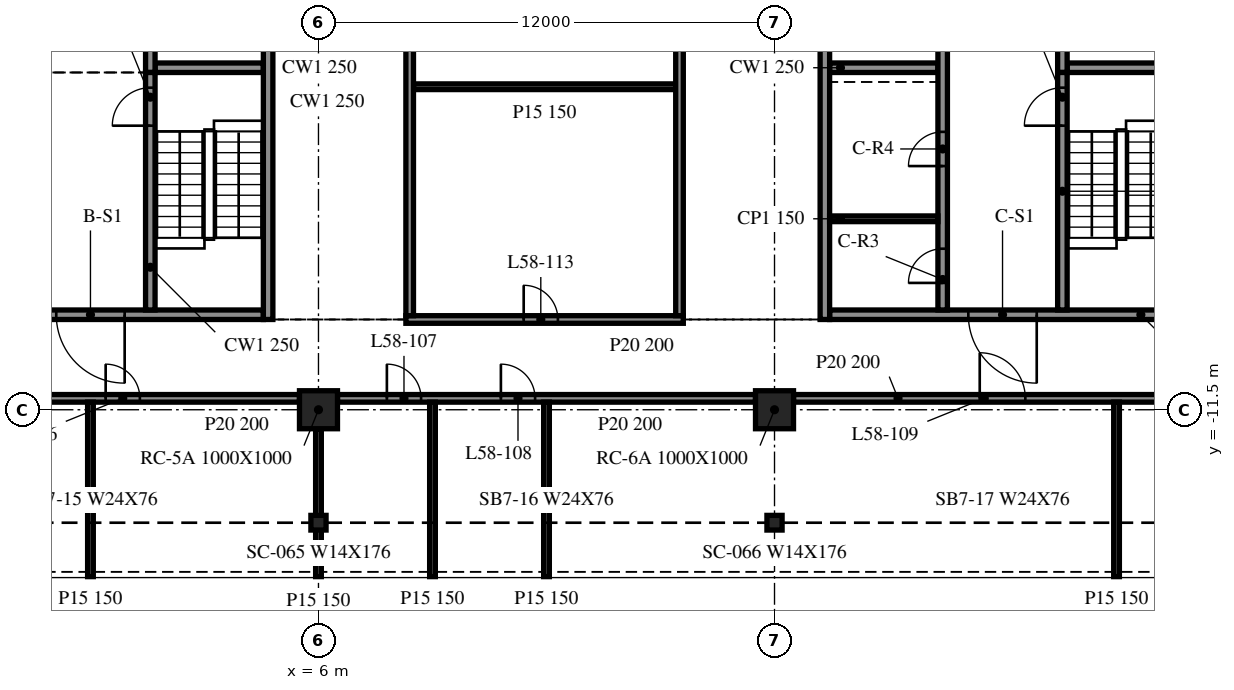
"""IFC4 building model, lengths in metres.
Left out: names, types, materials, properties, quantities, classifications, styles, units other than length and angle.
Written with IfcOpenShell. Run it as: python <this file> out.ifc"""

import sys

from ifc_helpers import new_model, si_unit, direction, frame, frame_2d, origin, origin_2d, place, context, subcontext, project, spatial, rectangle, i_section, extrude, element, fill, save


model = new_model("IFC4")
c1 = context("Model", 3, precision=1e-05, world=origin(), true_north=direction((0.0, 1.0)))
c2 = subcontext(c1, "Body", "Model", "MODEL_VIEW")
j1 = project(units=[si_unit("LENGTHUNIT", "METRE"), si_unit("PLANEANGLEUNIT", "RADIAN")], contexts=[c1])
p1 = place(None, origin())
s1 = spatial("IfcSite", under=j1, at=p1, CompositionType="ELEMENT")
p2 = place(p1, origin())
s2 = spatial("IfcBuilding", under=s1, at=p2, CompositionType="ELEMENT")
p3 = place(p2, frame((0.0, 0.0, 240.0)))
s3 = spatial("IfcBuildingStorey", under=s2, at=p3, CompositionType="ELEMENT", Elevation=240.0)
for number, where, z_axis, x_axis in (
    (1, (6.0, -11.5, -0.34), (0.0, 0.0, 1.0), (1.0, 0.0, 0.0)),
    (2, (18.0, -11.5, -0.34), (0.0, 0.0, 1.0), (1.0, 0.0, 0.0)),
):
    element("IfcColumn", number, at=place(p3, frame(where, z_axis=z_axis, x_axis=x_axis)), inside=s3, PredefinedType="COLUMN", context=c2, shape_type="SweptSolid", body=[
        extrude(rectangle(XDim=1.0, YDim=1.0, at=origin_2d()), origin(), (0.0, 0.0, 1.0), 3.8),
    ])
for number, where, z_axis, x_axis in (
    (3, (6.0, -14.473, -0.34), (0.0, 0.0, 1.0), (1.0, 0.0, 0.0)),
    (4, (18.0, -14.473, -0.34), (0.0, 0.0, 1.0), (1.0, 0.0, 0.0)),
):
    element("IfcColumn", number, at=place(p3, frame(where, z_axis=z_axis, x_axis=x_axis)), inside=s3, PredefinedType="COLUMN", context=c2, shape_type="SweptSolid", body=[
        extrude(i_section(OverallWidth=0.399, OverallDepth=0.386, WebThickness=0.021, FlangeThickness=0.033, at=origin_2d()), origin(), (0.0, 0.0, 1.0), 3.8),
    ])
p4 = place(p3, frame((4.675, -9.125, 0.0), z_axis=(0.0, 0.0, 1.0), x_axis=(0.0, 1.0, 0.0)))
e5 = element("IfcWall", 5, at=p4, inside=s3, PredefinedType="SOLIDWALL", context=c2, shape_type="SweptSolid", body=[
    extrude(rectangle(XDim=24.25, YDim=0.25, at=frame_2d((12.125, 0.0))), origin(), (0.0, 0.0, 1.0), 3.46),
])
p5 = place(p3, frame((4.55, -9.0, 0.0), z_axis=(0.0, 0.0, 1.0), x_axis=(-1.0, 0.0, 0.0)))
e6 = element("IfcWall", 6, at=p5, inside=s3, PredefinedType="SOLIDWALL", context=c2, shape_type="SweptSolid", body=[
    extrude(rectangle(XDim=9.1, YDim=0.25, at=frame_2d((4.55, 0.0))), origin(), (0.0, 0.0, 1.0), 3.46),
])
p6 = place(p5, frame((3.65, 0.0, 0.0)))
e7 = element("IfcOpeningElement", 7, at=p6, cuts=e6, PredefinedType="OPENING", context=c2, shape_type="SweptSolid", body=[
    extrude(rectangle(XDim=1.8, YDim=2.1, at=frame_2d((0.9, 1.05))), frame((0.0, 0.135, 0.0), z_axis=(0.0, -1.0, 0.0), x_axis=(1.0, 0.0, 0.0)), (0.0, 0.0, 1.0), 0.27),
])
p7 = place(p3, frame((1.575, -8.875, 0.0), z_axis=(0.0, 0.0, 1.0), x_axis=(0.0, 1.0, 0.0)))
e8 = element("IfcWall", 8, at=p7, inside=s3, PredefinedType="SOLIDWALL", context=c2, shape_type="SweptSolid", body=[
    extrude(rectangle(XDim=6.25, YDim=0.25, at=frame_2d((3.125, 0.0))), origin(), (0.0, 0.0, 1.0), 3.46),
])
p8 = place(p7, frame((4.85, 0.0, 0.0)))
e9 = element("IfcOpeningElement", 9, at=p8, cuts=e8, PredefinedType="OPENING", context=c2, shape_type="SweptSolid", body=[
    extrude(rectangle(XDim=1.0, YDim=2.1, at=frame_2d((0.5, 1.05))), frame((0.0, 0.135, 0.0), z_axis=(0.0, -1.0, 0.0), x_axis=(1.0, 0.0, 0.0)), (0.0, 0.0, 1.0), 0.27),
])
p9 = place(p3, frame((1.575, 14.875, 0.0), z_axis=(0.0, 0.0, 1.0), x_axis=(0.0, -1.0, 0.0)))
e10 = element("IfcWall", 10, at=p9, inside=s3, PredefinedType="SOLIDWALL", context=c2, shape_type="SweptSolid", body=[
    extrude(rectangle(XDim=17.5, YDim=0.25, at=frame_2d((8.75, 0.0))), origin(), (0.0, 0.0, 1.0), 3.46),
])
p10 = place(p9, frame((15.45, 0.0, 0.0)))
e11 = element("IfcOpeningElement", 11, at=p10, cuts=e10, PredefinedType="OPENING", context=c2, shape_type="SweptSolid", body=[
    extrude(rectangle(XDim=1.1, YDim=2.1, at=frame_2d((0.55, 1.05))), frame((0.0, 0.135, 0.0), z_axis=(0.0, -1.0, 0.0), x_axis=(1.0, 0.0, 0.0)), (0.0, 0.0, 1.0), 0.27),
])
p11 = place(p9, frame((12.7, 0.0, 0.0)))
e12 = element("IfcOpeningElement", 12, at=p11, cuts=e10, PredefinedType="OPENING", context=c2, shape_type="SweptSolid", body=[
    extrude(rectangle(XDim=1.1, YDim=2.1, at=frame_2d((0.55, 1.05))), frame((0.0, 0.135, 0.0), z_axis=(0.0, -1.0, 0.0), x_axis=(1.0, 0.0, 0.0)), (0.0, 0.0, 1.0), 0.27),
])
p12 = place(p9, frame((9.95, 0.0, 0.0)))
e13 = element("IfcOpeningElement", 13, at=p12, cuts=e10, PredefinedType="OPENING", context=c2, shape_type="SweptSolid", body=[
    extrude(rectangle(XDim=1.1, YDim=2.1, at=frame_2d((0.55, 1.05))), frame((0.0, 0.135, 0.0), z_axis=(0.0, -1.0, 0.0), x_axis=(1.0, 0.0, 0.0)), (0.0, 0.0, 1.0), 0.27),
])
p13 = place(p9, frame((7.2, 0.0, 0.0)))
e14 = element("IfcOpeningElement", 14, at=p13, cuts=e10, PredefinedType="OPENING", context=c2, shape_type="SweptSolid", body=[
    extrude(rectangle(XDim=1.1, YDim=2.1, at=frame_2d((0.55, 1.05))), frame((0.0, 0.135, 0.0), z_axis=(0.0, -1.0, 0.0), x_axis=(1.0, 0.0, 0.0)), (0.0, 0.0, 1.0), 0.27),
])
p14 = place(p9, frame((4.387, 0.0, 0.0)))
e15 = element("IfcOpeningElement", 15, at=p14, cuts=e10, PredefinedType="OPENING", context=c2, shape_type="SweptSolid", body=[
    extrude(rectangle(XDim=0.9, YDim=2.1, at=frame_2d((0.45, 1.05))), frame((0.0, 0.135, 0.0), z_axis=(0.0, -1.0, 0.0), x_axis=(1.0, 0.0, 0.0)), (0.0, 0.0, 1.0), 0.27),
])
p15 = place(p9, frame((1.312, 0.0, 0.0)))
e16 = element("IfcOpeningElement", 16, at=p15, cuts=e10, PredefinedType="OPENING", context=c2, shape_type="SweptSolid", body=[
    extrude(rectangle(XDim=0.9, YDim=2.1, at=frame_2d((0.45, 1.05))), frame((0.0, 0.135, 0.0), z_axis=(0.0, -1.0, 0.0), x_axis=(1.0, 0.0, 0.0)), (0.0, 0.0, 1.0), 0.27),
])
p16 = place(p3, frame((1.7, -2.5, 0.0), z_axis=(0.0, 0.0, 1.0), x_axis=(1.0, 0.0, 0.0)))
e17 = element("IfcWall", 17, at=p16, inside=s3, PredefinedType="SOLIDWALL", context=c2, shape_type="SweptSolid", body=[
    extrude(rectangle(XDim=2.85, YDim=0.25, at=frame_2d((1.425, 0.0))), origin(), (0.0, 0.0, 1.0), 3.46),
])
p17 = place(p3, frame((19.325, 15.125, 0.0), z_axis=(0.0, 0.0, 1.0), x_axis=(0.0, -1.0, 0.0)))
e18 = element("IfcWall", 18, at=p17, inside=s3, PredefinedType="SOLIDWALL", context=c2, shape_type="SweptSolid", body=[
    extrude(rectangle(XDim=24.25, YDim=0.25, at=frame_2d((12.125, 0.0))), origin(), (0.0, 0.0, 1.0), 3.46),
])
p18 = place(p3, frame((28.55, -9.0, 0.0), z_axis=(0.0, 0.0, 1.0), x_axis=(-1.0, 0.0, 0.0)))
e19 = element("IfcWall", 19, at=p18, inside=s3, PredefinedType="SOLIDWALL", context=c2, shape_type="SweptSolid", body=[
    extrude(rectangle(XDim=9.1, YDim=0.25, at=frame_2d((4.55, 0.0))), origin(), (0.0, 0.0, 1.0), 3.46),
])
p19 = place(p18, frame((3.65, 0.0, 0.0)))
e20 = element("IfcOpeningElement", 20, at=p19, cuts=e19, PredefinedType="OPENING", context=c2, shape_type="SweptSolid", body=[
    extrude(rectangle(XDim=1.8, YDim=2.1, at=frame_2d((0.9, 1.05))), frame((0.0, 0.135, 0.0), z_axis=(0.0, -1.0, 0.0), x_axis=(1.0, 0.0, 0.0)), (0.0, 0.0, 1.0), 0.27),
])
p20 = place(p3, frame((22.425, -8.875, 0.0), z_axis=(0.0, 0.0, 1.0), x_axis=(0.0, 1.0, 0.0)))
e21 = element("IfcWall", 21, at=p20, inside=s3, PredefinedType="SOLIDWALL", context=c2, shape_type="SweptSolid", body=[
    extrude(rectangle(XDim=17.5, YDim=0.25, at=frame_2d((8.75, 0.0))), origin(), (0.0, 0.0, 1.0), 3.46),
])
p21 = place(p20, frame((7.2, 0.0, 0.0)))
e22 = element("IfcOpeningElement", 22, at=p21, cuts=e21, PredefinedType="OPENING", context=c2, shape_type="SweptSolid", body=[
    extrude(rectangle(XDim=1.1, YDim=2.1, at=frame_2d((0.55, 1.05))), frame((0.0, 0.135, 0.0), z_axis=(0.0, -1.0, 0.0), x_axis=(1.0, 0.0, 0.0)), (0.0, 0.0, 1.0), 0.27),
])
p22 = place(p20, frame((9.95, 0.0, 0.0)))
e23 = element("IfcOpeningElement", 23, at=p22, cuts=e21, PredefinedType="OPENING", context=c2, shape_type="SweptSolid", body=[
    extrude(rectangle(XDim=1.1, YDim=2.1, at=frame_2d((0.55, 1.05))), frame((0.0, 0.135, 0.0), z_axis=(0.0, -1.0, 0.0), x_axis=(1.0, 0.0, 0.0)), (0.0, 0.0, 1.0), 0.27),
])
p23 = place(p20, frame((12.7, 0.0, 0.0)))
e24 = element("IfcOpeningElement", 24, at=p23, cuts=e21, PredefinedType="OPENING", context=c2, shape_type="SweptSolid", body=[
    extrude(rectangle(XDim=1.1, YDim=2.1, at=frame_2d((0.55, 1.05))), frame((0.0, 0.135, 0.0), z_axis=(0.0, -1.0, 0.0), x_axis=(1.0, 0.0, 0.0)), (0.0, 0.0, 1.0), 0.27),
])
p24 = place(p20, frame((15.45, 0.0, 0.0)))
e25 = element("IfcOpeningElement", 25, at=p24, cuts=e21, PredefinedType="OPENING", context=c2, shape_type="SweptSolid", body=[
    extrude(rectangle(XDim=1.1, YDim=2.1, at=frame_2d((0.55, 1.05))), frame((0.0, 0.135, 0.0), z_axis=(0.0, -1.0, 0.0), x_axis=(1.0, 0.0, 0.0)), (0.0, 0.0, 1.0), 0.27),
])
p25 = place(p20, frame((0.712, 0.0, 0.0)))
e26 = element("IfcOpeningElement", 26, at=p25, cuts=e21, PredefinedType="OPENING", context=c2, shape_type="SweptSolid", body=[
    extrude(rectangle(XDim=0.9, YDim=2.1, at=frame_2d((0.45, 1.05))), frame((0.0, 0.135, 0.0), z_axis=(0.0, -1.0, 0.0), x_axis=(1.0, 0.0, 0.0)), (0.0, 0.0, 1.0), 0.27),
])
p26 = place(p20, frame((3.788, 0.0, 0.0)))
e27 = element("IfcOpeningElement", 27, at=p26, cuts=e21, PredefinedType="OPENING", context=c2, shape_type="SweptSolid", body=[
    extrude(rectangle(XDim=0.9, YDim=2.1, at=frame_2d((0.45, 1.05))), frame((0.0, 0.135, 0.0), z_axis=(0.0, -1.0, 0.0), x_axis=(1.0, 0.0, 0.0)), (0.0, 0.0, 1.0), 0.27),
])
p27 = place(p3, frame((25.575, -8.875, 0.0), z_axis=(0.0, 0.0, 1.0), x_axis=(0.0, 1.0, 0.0)))
e28 = element("IfcWall", 28, at=p27, inside=s3, PredefinedType="SOLIDWALL", context=c2, shape_type="SweptSolid", body=[
    extrude(rectangle(XDim=6.25, YDim=0.25, at=frame_2d((3.125, 0.0))), origin(), (0.0, 0.0, 1.0), 3.46),
])
p28 = place(p27, frame((4.85, 0.0, 0.0)))
e29 = element("IfcOpeningElement", 29, at=p28, cuts=e28, PredefinedType="OPENING", context=c2, shape_type="SweptSolid", body=[
    extrude(rectangle(XDim=1.0, YDim=2.1, at=frame_2d((0.5, 1.05))), frame((0.0, 0.135, 0.0), z_axis=(0.0, -1.0, 0.0), x_axis=(1.0, 0.0, 0.0)), (0.0, 0.0, 1.0), 0.27),
])
p29 = place(p3, frame((25.575, 14.875, 0.0), z_axis=(0.0, 0.0, 1.0), x_axis=(0.0, -1.0, 0.0)))
e30 = element("IfcWall", 30, at=p29, inside=s3, PredefinedType="SOLIDWALL", context=c2, shape_type="SweptSolid", body=[
    extrude(rectangle(XDim=17.5, YDim=0.25, at=frame_2d((8.75, 0.0))), origin(), (0.0, 0.0, 1.0), 3.46),
])
p30 = place(p29, frame((15.45, 0.0, 0.0)))
e31 = element("IfcOpeningElement", 31, at=p30, cuts=e30, PredefinedType="OPENING", context=c2, shape_type="SweptSolid", body=[
    extrude(rectangle(XDim=1.1, YDim=2.1, at=frame_2d((0.55, 1.05))), frame((0.0, 0.135, 0.0), z_axis=(0.0, -1.0, 0.0), x_axis=(1.0, 0.0, 0.0)), (0.0, 0.0, 1.0), 0.27),
])
p31 = place(p29, frame((12.8, 0.0, 0.0)))
e32 = element("IfcOpeningElement", 32, at=p31, cuts=e30, PredefinedType="OPENING", context=c2, shape_type="SweptSolid", body=[
    extrude(rectangle(XDim=0.9, YDim=2.1, at=frame_2d((0.45, 1.05))), frame((0.0, 0.135, 0.0), z_axis=(0.0, -1.0, 0.0), x_axis=(1.0, 0.0, 0.0)), (0.0, 0.0, 1.0), 0.27),
])
for number, where, z_axis, x_axis in (
    (33, (19.45, -2.5, 0.0), (0.0, 0.0, 1.0), (1.0, 0.0, 0.0)),
    (34, (25.7, -2.5, 0.0), (0.0, 0.0, 1.0), (1.0, 0.0, 0.0)),
):
    element("IfcWall", number, at=place(p3, frame(where, z_axis=z_axis, x_axis=x_axis)), inside=s3, PredefinedType="SOLIDWALL", context=c2, shape_type="SweptSolid", body=[
        extrude(rectangle(XDim=2.85, YDim=0.25, at=frame_2d((1.425, 0.0))), origin(), (0.0, 0.0, 1.0), 3.46),
    ])
p32 = place(p3, frame((19.45, -6.475, 0.0), z_axis=(0.0, 0.0, 1.0), x_axis=(1.0, 0.0, 0.0)))
e35 = element("IfcWall", 35, at=p32, inside=s3, PredefinedType="PARTITIONING", context=c2, shape_type="SweptSolid", body=[
    extrude(rectangle(XDim=2.85, YDim=0.15, at=frame_2d((1.425, 0.0))), origin(), (0.0, 0.0, 1.0), 3.46),
])
p33 = place(p3, frame((-5.5, -11.2, 0.0), z_axis=(0.0, 0.0, 1.0), x_axis=(1.0, 0.0, 0.0)))
e36 = element("IfcWall", 36, at=p33, inside=s3, PredefinedType="PARTITIONING", context=c2, shape_type="SweptSolid", body=[
    extrude(rectangle(XDim=11.0, YDim=0.2, at=frame_2d((5.5, 0.0))), origin(), (0.0, 0.0, 1.0), 3.46),
])
p34 = place(p33, frame((5.9, 0.0, 0.0)))
e37 = element("IfcOpeningElement", 37, at=p34, cuts=e36, PredefinedType="OPENING", context=c2, shape_type="SweptSolid", body=[
    extrude(rectangle(XDim=0.9, YDim=2.1, at=frame_2d((0.45, 1.05))), frame((0.0, 0.11, 0.0), z_axis=(0.0, -1.0, 0.0), x_axis=(1.0, 0.0, 0.0)), (0.0, 0.0, 1.0), 0.22),
])
p35 = place(p3, frame((6.5, -11.2, 0.0), z_axis=(0.0, 0.0, 1.0), x_axis=(1.0, 0.0, 0.0)))
e38 = element("IfcWall", 38, at=p35, inside=s3, PredefinedType="PARTITIONING", context=c2, shape_type="SweptSolid", body=[
    extrude(rectangle(XDim=11.0, YDim=0.2, at=frame_2d((5.5, 0.0))), origin(), (0.0, 0.0, 1.0), 3.46),
])
p36 = place(p35, frame((1.3, 0.0, 0.0)))
e39 = element("IfcOpeningElement", 39, at=p36, cuts=e38, PredefinedType="OPENING", context=c2, shape_type="SweptSolid", body=[
    extrude(rectangle(XDim=0.9, YDim=2.1, at=frame_2d((0.45, 1.05))), frame((0.0, 0.11, 0.0), z_axis=(0.0, -1.0, 0.0), x_axis=(1.0, 0.0, 0.0)), (0.0, 0.0, 1.0), 0.22),
])
p37 = place(p35, frame((4.3, 0.0, 0.0)))
e40 = element("IfcOpeningElement", 40, at=p37, cuts=e38, PredefinedType="OPENING", context=c2, shape_type="SweptSolid", body=[
    extrude(rectangle(XDim=0.9, YDim=2.1, at=frame_2d((0.45, 1.05))), frame((0.0, 0.11, 0.0), z_axis=(0.0, -1.0, 0.0), x_axis=(1.0, 0.0, 0.0)), (0.0, 0.0, 1.0), 0.22),
])
p38 = place(p3, frame((18.5, -11.2, 0.0), z_axis=(0.0, 0.0, 1.0), x_axis=(1.0, 0.0, 0.0)))
e41 = element("IfcWall", 41, at=p38, inside=s3, PredefinedType="PARTITIONING", context=c2, shape_type="SweptSolid", body=[
    extrude(rectangle(XDim=11.0, YDim=0.2, at=frame_2d((5.5, 0.0))), origin(), (0.0, 0.0, 1.0), 3.46),
])
p39 = place(p38, frame((4.9, 0.0, 0.0)))
e42 = element("IfcOpeningElement", 42, at=p39, cuts=e41, PredefinedType="OPENING", context=c2, shape_type="SweptSolid", body=[
    extrude(rectangle(XDim=1.2, YDim=2.1, at=frame_2d((0.6, 1.05))), frame((0.0, 0.11, 0.0), z_axis=(0.0, -1.0, 0.0), x_axis=(1.0, 0.0, 0.0)), (0.0, 0.0, 1.0), 0.22),
])
p40 = place(p3, frame((8.3, -9.125, 0.0), z_axis=(0.0, 0.0, 1.0), x_axis=(1.0, 0.0, 0.0)))
e43 = element("IfcWall", 43, at=p40, inside=s3, PredefinedType="PARTITIONING", context=c2, shape_type="SweptSolid", body=[
    extrude(rectangle(XDim=7.3, YDim=0.2, at=frame_2d((3.65, 0.0))), origin(), (0.0, 0.0, 1.0), 3.46),
])
p41 = place(p40, frame((3.1, 0.0, 0.0)))
e44 = element("IfcOpeningElement", 44, at=p41, cuts=e43, PredefinedType="OPENING", context=c2, shape_type="SweptSolid", body=[
    extrude(rectangle(XDim=0.9, YDim=2.1, at=frame_2d((0.45, 1.05))), frame((0.0, 0.11, 0.0), z_axis=(0.0, -1.0, 0.0), x_axis=(1.0, 0.0, 0.0)), (0.0, 0.0, 1.0), 0.22),
])
p42 = place(p3, frame((8.5, -3.0, 0.0), z_axis=(0.0, 0.0, 1.0), x_axis=(1.0, 0.0, 0.0)))
e45 = element("IfcWall", 45, at=p42, inside=s3, PredefinedType="PARTITIONING", context=c2, shape_type="SweptSolid", body=[
    extrude(rectangle(XDim=6.9, YDim=0.15, at=frame_2d((3.45, 0.0))), origin(), (0.0, 0.0, 1.0), 3.46),
])
p43 = place(p3, frame((0.0, -15.892, 0.0), z_axis=(0.0, 0.0, 1.0), x_axis=(0.0, 1.0, 0.0)))
e46 = element("IfcWall", 46, at=p43, inside=s3, PredefinedType="PARTITIONING", context=c2, shape_type="SweptSolid", body=[
    extrude(rectangle(XDim=4.592, YDim=0.15, at=frame_2d((2.296, 0.0))), origin(), (0.0, 0.0, 1.0), 3.46),
])
p44 = place(p3, frame((6.0, -15.892, 0.0), z_axis=(0.0, 0.0, 1.0), x_axis=(0.0, 1.0, 0.0)))
e47 = element("IfcWall", 47, at=p44, inside=s3, PredefinedType="PARTITIONING", context=c2, shape_type="SweptSolid", body=[
    extrude(rectangle(XDim=3.892, YDim=0.15, at=frame_2d((1.946, 0.0))), origin(), (0.0, 0.0, 1.0), 3.46),
])
p45 = place(p3, frame((8.4, -9.025, 0.0), z_axis=(0.0, 0.0, 1.0), x_axis=(0.0, 1.0, 0.0)))
e48 = element("IfcWall", 48, at=p45, inside=s3, PredefinedType="PARTITIONING", context=c2, shape_type="SweptSolid", body=[
    extrude(rectangle(XDim=24.05, YDim=0.2, at=frame_2d((12.025, 0.0))), origin(), (0.0, 0.0, 1.0), 3.46),
])
p46 = place(p45, frame((11.5, 0.0, 0.0)))
e49 = element("IfcOpeningElement", 49, at=p46, cuts=e48, PredefinedType="OPENING", context=c2, shape_type="SweptSolid", body=[
    extrude(rectangle(XDim=0.9, YDim=2.1, at=frame_2d((0.45, 1.05))), frame((0.0, 0.11, 0.0), z_axis=(0.0, -1.0, 0.0), x_axis=(1.0, 0.0, 0.0)), (0.0, 0.0, 1.0), 0.22),
])
for number, where, z_axis, x_axis in (
    (50, (9.0, -15.892, 0.0), (0.0, 0.0, 1.0), (0.0, 1.0, 0.0)),
    (51, (12.0, -15.892, 0.0), (0.0, 0.0, 1.0), (0.0, 1.0, 0.0)),
):
    element("IfcWall", number, at=place(p3, frame(where, z_axis=z_axis, x_axis=x_axis)), inside=s3, PredefinedType="PARTITIONING", context=c2, shape_type="SweptSolid", body=[
        extrude(rectangle(XDim=4.592, YDim=0.15, at=frame_2d((2.296, 0.0))), origin(), (0.0, 0.0, 1.0), 3.46),
    ])
p47 = place(p3, frame((15.5, -9.025, 0.0), z_axis=(0.0, 0.0, 1.0), x_axis=(0.0, 1.0, 0.0)))
e52 = element("IfcWall", 52, at=p47, inside=s3, PredefinedType="PARTITIONING", context=c2, shape_type="SweptSolid", body=[
    extrude(rectangle(XDim=24.05, YDim=0.2, at=frame_2d((12.025, 0.0))), origin(), (0.0, 0.0, 1.0), 3.46),
])
p48 = place(p3, frame((27.0, -15.892, 0.0), z_axis=(0.0, 0.0, 1.0), x_axis=(0.0, 1.0, 0.0)))
e53 = element("IfcWall", 53, at=p48, inside=s3, PredefinedType="PARTITIONING", context=c2, shape_type="SweptSolid", body=[
    extrude(rectangle(XDim=4.592, YDim=0.15, at=frame_2d((2.296, 0.0))), origin(), (0.0, 0.0, 1.0), 3.46),
])
p49 = place(p6, origin())
e54 = element("IfcDoor", 54, at=p49, inside=s3, OperationType="DOUBLE_DOOR_SINGLE_SWING", PredefinedType="DOOR", context=c2, shape_type="SweptSolid", body=[
    extrude(rectangle(XDim=1.8, YDim=2.1, at=frame_2d((0.9, 1.05))), frame((0.0, 0.025, 0.0), z_axis=(0.0, -1.0, 0.0), x_axis=(1.0, 0.0, 0.0)), (0.0, 0.0, 1.0), 0.05),
])
fill(e7, e54)
p50 = place(p8, origin())
e55 = element("IfcDoor", 55, at=p50, inside=s3, OperationType="SINGLE_SWING_LEFT", PredefinedType="DOOR", context=c2, shape_type="SweptSolid", body=[
    extrude(rectangle(XDim=1.0, YDim=2.1, at=frame_2d((0.5, 1.05))), frame((0.0, 0.025, 0.0), z_axis=(0.0, -1.0, 0.0), x_axis=(1.0, 0.0, 0.0)), (0.0, 0.0, 1.0), 0.05),
])
fill(e9, e55)
p51 = place(p19, origin())
e56 = element("IfcDoor", 56, at=p51, inside=s3, OperationType="DOUBLE_DOOR_SINGLE_SWING", PredefinedType="DOOR", context=c2, shape_type="SweptSolid", body=[
    extrude(rectangle(XDim=1.8, YDim=2.1, at=frame_2d((0.9, 1.05))), frame((0.0, 0.025, 0.0), z_axis=(0.0, -1.0, 0.0), x_axis=(1.0, 0.0, 0.0)), (0.0, 0.0, 1.0), 0.05),
])
fill(e20, e56)
p52 = place(p25, origin())
e57 = element("IfcDoor", 57, at=p52, inside=s3, OperationType="SINGLE_SWING_LEFT", PredefinedType="DOOR", context=c2, shape_type="SweptSolid", body=[
    extrude(rectangle(XDim=0.9, YDim=2.1, at=frame_2d((0.45, 1.05))), frame((0.0, 0.025, 0.0), z_axis=(0.0, -1.0, 0.0), x_axis=(1.0, 0.0, 0.0)), (0.0, 0.0, 1.0), 0.05),
])
fill(e26, e57)
p53 = place(p26, origin())
e58 = element("IfcDoor", 58, at=p53, inside=s3, OperationType="SINGLE_SWING_RIGHT", PredefinedType="DOOR", context=c2, shape_type="SweptSolid", body=[
    extrude(rectangle(XDim=0.9, YDim=2.1, at=frame_2d((0.45, 1.05))), frame((0.0, 0.025, 0.0), z_axis=(0.0, -1.0, 0.0), x_axis=(1.0, 0.0, 0.0)), (0.0, 0.0, 1.0), 0.05),
])
fill(e27, e58)
p54 = place(p28, origin())
e59 = element("IfcDoor", 59, at=p54, inside=s3, OperationType="SINGLE_SWING_RIGHT", PredefinedType="DOOR", context=c2, shape_type="SweptSolid", body=[
    extrude(rectangle(XDim=1.0, YDim=2.1, at=frame_2d((0.5, 1.05))), frame((0.0, 0.025, 0.0), z_axis=(0.0, -1.0, 0.0), x_axis=(1.0, 0.0, 0.0)), (0.0, 0.0, 1.0), 0.05),
])
fill(e29, e59)
p55 = place(p34, origin())
e60 = element("IfcDoor", 60, at=p55, inside=s3, OperationType="SINGLE_SWING_LEFT", PredefinedType="DOOR", context=c2, shape_type="SweptSolid", body=[
    extrude(rectangle(XDim=0.9, YDim=2.1, at=frame_2d((0.45, 1.05))), frame((0.0, 0.025, 0.0), z_axis=(0.0, -1.0, 0.0), x_axis=(1.0, 0.0, 0.0)), (0.0, 0.0, 1.0), 0.05),
])
fill(e37, e60)
p56 = place(p36, origin())
e61 = element("IfcDoor", 61, at=p56, inside=s3, OperationType="SINGLE_SWING_RIGHT", PredefinedType="DOOR", context=c2, shape_type="SweptSolid", body=[
    extrude(rectangle(XDim=0.9, YDim=2.1, at=frame_2d((0.45, 1.05))), frame((0.0, 0.025, 0.0), z_axis=(0.0, -1.0, 0.0), x_axis=(1.0, 0.0, 0.0)), (0.0, 0.0, 1.0), 0.05),
])
fill(e39, e61)
p57 = place(p37, origin())
e62 = element("IfcDoor", 62, at=p57, inside=s3, OperationType="SINGLE_SWING_RIGHT", PredefinedType="DOOR", context=c2, shape_type="SweptSolid", body=[
    extrude(rectangle(XDim=0.9, YDim=2.1, at=frame_2d((0.45, 1.05))), frame((0.0, 0.025, 0.0), z_axis=(0.0, -1.0, 0.0), x_axis=(1.0, 0.0, 0.0)), (0.0, 0.0, 1.0), 0.05),
])
fill(e40, e62)
p58 = place(p39, origin())
e63 = element("IfcDoor", 63, at=p58, inside=s3, OperationType="SINGLE_SWING_LEFT", PredefinedType="DOOR", context=c2, shape_type="SweptSolid", body=[
    extrude(rectangle(XDim=1.2, YDim=2.1, at=frame_2d((0.6, 1.05))), frame((0.0, 0.025, 0.0), z_axis=(0.0, -1.0, 0.0), x_axis=(1.0, 0.0, 0.0)), (0.0, 0.0, 1.0), 0.05),
])
fill(e42, e63)
p59 = place(p41, origin())
e64 = element("IfcDoor", 64, at=p59, inside=s3, OperationType="SINGLE_SWING_LEFT", PredefinedType="DOOR", context=c2, shape_type="SweptSolid", body=[
    extrude(rectangle(XDim=0.9, YDim=2.1, at=frame_2d((0.45, 1.05))), frame((0.0, 0.025, 0.0), z_axis=(0.0, -1.0, 0.0), x_axis=(1.0, 0.0, 0.0)), (0.0, 0.0, 1.0), 0.05),
])
fill(e44, e64)
save(model, sys.argv[1])
